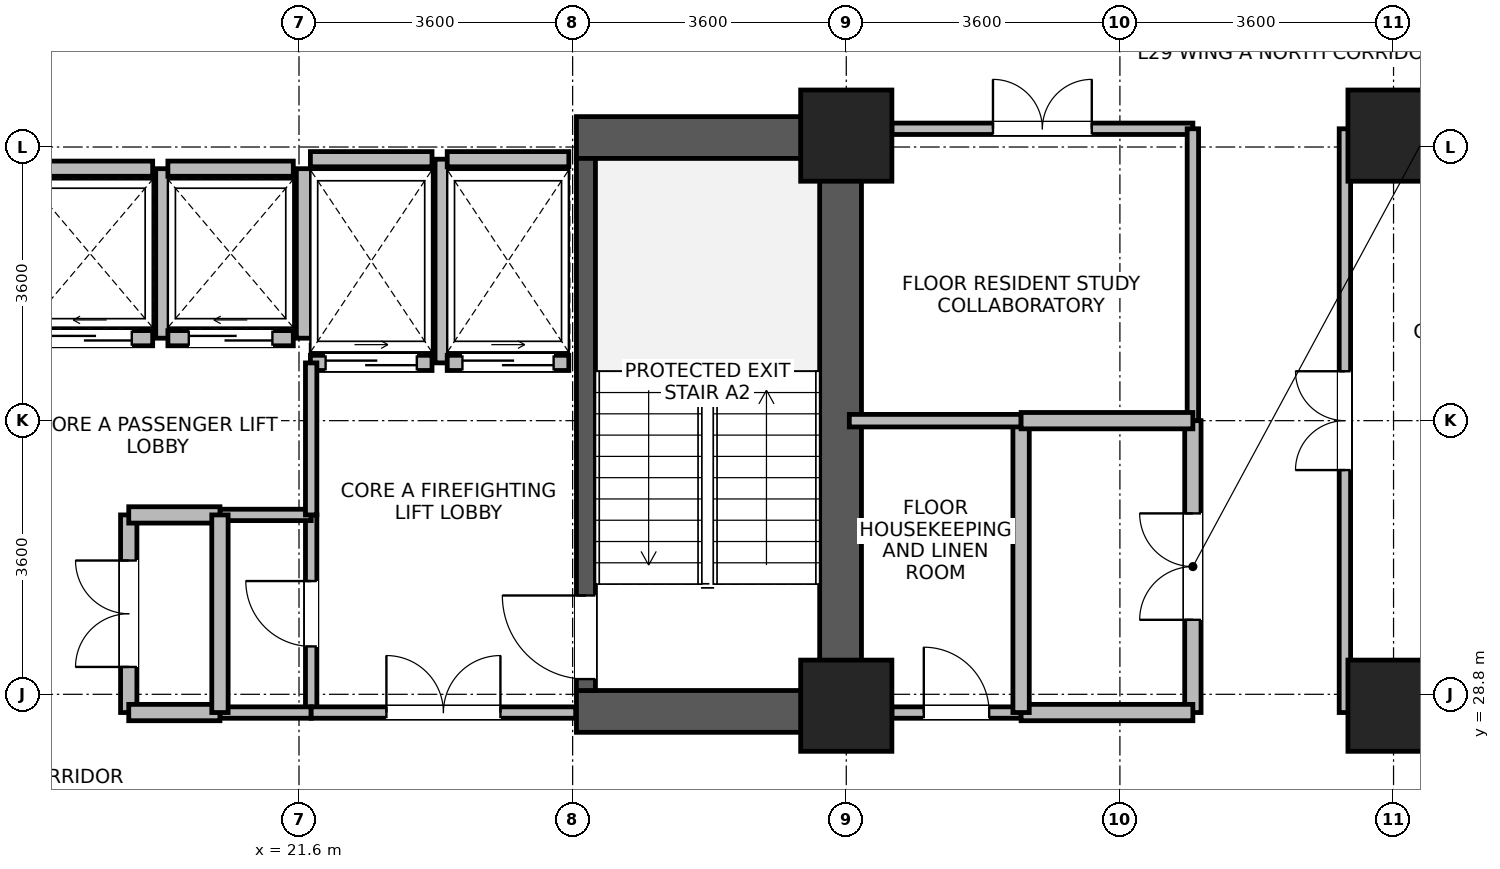
"""IFC4 building model, lengths in metres.
Left out: names, types, materials, properties, quantities, classifications, styles, units other than length and angle.
Written with IfcOpenShell. Run it as: python <this file> out.ifc"""

import sys

from ifc_helpers import new_model, si_unit, direction, frame, frame_2d, origin, origin_2d, place, context, subcontext, project, spatial, rectangle, extrude, source, transform, mapped, element, fill, save


model = new_model("IFC4")
c1 = context("Model", 3, precision=1e-05, world=origin(), true_north=direction((0.0, 1.0)))
c2 = subcontext(c1, "Body", "Model", "MODEL_VIEW")
j1 = project(units=[si_unit("LENGTHUNIT", "METRE"), si_unit("PLANEANGLEUNIT", "RADIAN")], contexts=[c1])
p1 = place(None, origin())
s1 = spatial("IfcSite", under=j1, at=p1, CompositionType="ELEMENT")
p2 = place(p1, origin())
s2 = spatial("IfcBuilding", under=s1, at=p2, CompositionType="ELEMENT")
p3 = place(p2, frame((0.0, 0.0, 115.6)))
s3 = spatial("IfcBuildingStorey", under=s2, at=p3, CompositionType="ELEMENT", Elevation=115.6)
p4 = place(p3, frame((28.725, 28.3, 0.0), z_axis=(0.0, 0.0, 1.0), x_axis=(0.0, 1.0, 0.0)))
e1 = element("IfcWall", 1, at=p4, inside=s3, PredefinedType="SHEAR", context=c2, shape_type="SweptSolid", body=[
    extrude(rectangle(XDim=8.1, YDim=0.55, at=frame_2d((4.05, 0.0))), origin(), (0.0, 0.0, 1.0), 3.45),
])
for number, where, z_axis, x_axis in (
    (2, (25.25, 28.575, 0.0), (0.0, 0.0, 1.0), (1.0, 0.0, 0.0)),
    (3, (25.25, 36.125, 0.0), (0.0, 0.0, 1.0), (1.0, 0.0, 0.0)),
):
    element("IfcWall", number, at=place(p3, frame(where, z_axis=z_axis, x_axis=x_axis)), inside=s3, PredefinedType="SHEAR", context=c2, shape_type="SweptSolid", body=[
        extrude(rectangle(XDim=3.2, YDim=0.55, at=frame_2d((1.6, 0.0))), origin(), (0.0, 0.0, 1.0), 3.45),
    ])
p5 = place(p3, frame((25.375, 28.85, 0.0), z_axis=(0.0, 0.0, 1.0), x_axis=(0.0, 1.0, 0.0)))
e4 = element("IfcWall", 4, at=p5, inside=s3, PredefinedType="SHEAR", context=c2, shape_type="SweptSolid", body=[
    extrude(rectangle(XDim=7.0, YDim=0.25, at=frame_2d((3.5, 0.0))), origin(), (0.0, 0.0, 1.0), 3.45),
])
p6 = place(p5, frame((0.15, 0.0, 0.0)))
e5 = element("IfcOpeningElement", 5, at=p6, cuts=e4, PredefinedType="OPENING", context=c2, shape_type="SweptSolid", body=[
    extrude(rectangle(XDim=1.1, YDim=2.08, at=frame_2d((0.55, 1.04))), frame((0.0, 0.135, 0.0), z_axis=(0.0, -1.0, 0.0), x_axis=(1.0, 0.0, 0.0)), (0.0, 0.0, 1.0), 0.27),
])
m1 = source(origin(), c2, "Body", "SweptSolid", [
    extrude(rectangle(XDim=1.2, YDim=1.2, at=origin_2d()), origin(), (0.0, 0.0, 1.0), 3.7),
])
for number, where, z_axis, x_axis in (
    (6, (28.8, 28.65, 0.0), (0.0, 0.0, 1.0), (1.0, 0.0, 0.0)),
    (7, (28.8, 36.15, 0.0), (0.0, 0.0, 1.0), (1.0, 0.0, 0.0)),
    (8, (36.0, 28.65, 0.0), (0.0, 0.0, 1.0), (1.0, 0.0, 0.0)),
    (9, (36.0, 36.15, 0.0), (0.0, 0.0, 1.0), (1.0, 0.0, 0.0)),
):
    element("IfcColumn", number, at=place(p3, frame(where, z_axis=z_axis, x_axis=x_axis)), inside=s3, PredefinedType="COLUMN", context=c2, shape_type="MappedRepresentation", body=[
        mapped(m1, transform((0.0, 0.0, 0.0), x_axis=(1.0, 0.0, 0.0), y_axis=(0.0, 1.0, 0.0), z_axis=(0.0, 0.0, 1.0), scale=1.0)),
    ])
p7 = place(p3, frame((18.025, 33.485, 0.0), z_axis=(0.0, 0.0, 1.0), x_axis=(1.0, 0.0, 0.0)))
e10 = element("IfcWall", 10, at=p7, inside=s3, PredefinedType="PARTITIONING", context=c2, shape_type="SweptSolid", body=[
    extrude(rectangle(XDim=1.65, YDim=0.2, at=frame_2d((0.825, 0.0))), origin(), (0.0, 0.0, 1.0), 3.43),
])
p8 = place(p7, frame((0.275, 0.0, 0.0)))
e11 = element("IfcOpeningElement", 11, at=p8, cuts=e10, PredefinedType="OPENING", context=c2, shape_type="SweptSolid", body=[
    extrude(rectangle(XDim=1.1, YDim=2.12, at=frame_2d((0.55, 1.06))), frame((0.0, 0.11, 0.0), z_axis=(0.0, -1.0, 0.0), x_axis=(1.0, 0.0, 0.0)), (0.0, 0.0, 1.0), 0.22),
])
p9 = place(p3, frame((18.025, 35.715, 0.0), z_axis=(0.0, 0.0, 1.0), x_axis=(1.0, 0.0, 0.0)))
e12 = element("IfcWall", 12, at=p9, inside=s3, PredefinedType="PARTITIONING", context=c2, shape_type="SweptSolid", body=[
    extrude(rectangle(XDim=1.65, YDim=0.2, at=frame_2d((0.825, 0.0))), origin(), (0.0, 0.0, 1.0), 3.43),
])
p10 = place(p3, frame((19.815, 33.485, 0.0), z_axis=(0.0, 0.0, 1.0), x_axis=(0.0, 1.0, 0.0)))
e13 = element("IfcWall", 13, at=p10, inside=s3, PredefinedType="PARTITIONING", context=c2, shape_type="SweptSolid", body=[
    extrude(rectangle(XDim=2.23, YDim=0.2, at=frame_2d((1.115, 0.0))), origin(), (0.0, 0.0, 1.0), 3.43),
])
p11 = place(p3, frame((19.875, 33.485, 0.0), z_axis=(0.0, 0.0, 1.0), x_axis=(1.0, 0.0, 0.0)))
e14 = element("IfcWall", 14, at=p11, inside=s3, PredefinedType="PARTITIONING", context=c2, shape_type="SweptSolid", body=[
    extrude(rectangle(XDim=1.65, YDim=0.2, at=frame_2d((0.825, 0.0))), origin(), (0.0, 0.0, 1.0), 3.43),
])
p12 = place(p11, frame((0.275, 0.0, 0.0)))
e15 = element("IfcOpeningElement", 15, at=p12, cuts=e14, PredefinedType="OPENING", context=c2, shape_type="SweptSolid", body=[
    extrude(rectangle(XDim=1.1, YDim=2.12, at=frame_2d((0.55, 1.06))), frame((0.0, 0.11, 0.0), z_axis=(0.0, -1.0, 0.0), x_axis=(1.0, 0.0, 0.0)), (0.0, 0.0, 1.0), 0.22),
])
p13 = place(p3, frame((19.875, 35.715, 0.0), z_axis=(0.0, 0.0, 1.0), x_axis=(1.0, 0.0, 0.0)))
e16 = element("IfcWall", 16, at=p13, inside=s3, PredefinedType="PARTITIONING", context=c2, shape_type="SweptSolid", body=[
    extrude(rectangle(XDim=1.65, YDim=0.2, at=frame_2d((0.825, 0.0))), origin(), (0.0, 0.0, 1.0), 3.43),
])
p14 = place(p3, frame((21.665, 33.485, 0.0), z_axis=(0.0, 0.0, 1.0), x_axis=(0.0, 1.0, 0.0)))
e17 = element("IfcWall", 17, at=p14, inside=s3, PredefinedType="PARTITIONING", context=c2, shape_type="SweptSolid", body=[
    extrude(rectangle(XDim=2.23, YDim=0.2, at=frame_2d((1.115, 0.0))), origin(), (0.0, 0.0, 1.0), 3.43),
])
p15 = place(p3, frame((21.75, 33.16, 0.0), z_axis=(0.0, 0.0, 1.0), x_axis=(1.0, 0.0, 0.0)))
e18 = element("IfcWall", 18, at=p15, inside=s3, PredefinedType="PARTITIONING", context=c2, shape_type="SweptSolid", body=[
    extrude(rectangle(XDim=1.6, YDim=0.2, at=frame_2d((0.8, 0.0))), origin(), (0.0, 0.0, 1.0), 3.43),
])
p16 = place(p15, frame((0.2, 0.0, 0.0)))
e19 = element("IfcOpeningElement", 19, at=p16, cuts=e18, PredefinedType="OPENING", context=c2, shape_type="SweptSolid", body=[
    extrude(rectangle(XDim=1.2, YDim=2.12, at=frame_2d((0.6, 1.06))), frame((0.0, 0.11, 0.0), z_axis=(0.0, -1.0, 0.0), x_axis=(1.0, 0.0, 0.0)), (0.0, 0.0, 1.0), 0.22),
])
p17 = place(p3, frame((21.75, 35.84, 0.0), z_axis=(0.0, 0.0, 1.0), x_axis=(1.0, 0.0, 0.0)))
e20 = element("IfcWall", 20, at=p17, inside=s3, PredefinedType="PARTITIONING", context=c2, shape_type="SweptSolid", body=[
    extrude(rectangle(XDim=1.6, YDim=0.2, at=frame_2d((0.8, 0.0))), origin(), (0.0, 0.0, 1.0), 2.43),
])
p18 = place(p3, frame((23.49, 33.16, 0.0), z_axis=(0.0, 0.0, 1.0), x_axis=(0.0, 1.0, 0.0)))
e21 = element("IfcWall", 21, at=p18, inside=s3, PredefinedType="PARTITIONING", context=c2, shape_type="SweptSolid", body=[
    extrude(rectangle(XDim=2.68, YDim=0.2, at=frame_2d((1.34, 0.0))), origin(), (0.0, 0.0, 1.0), 3.43),
])
p19 = place(p3, frame((23.55, 33.16, 0.0), z_axis=(0.0, 0.0, 1.0), x_axis=(1.0, 0.0, 0.0)))
e22 = element("IfcWall", 22, at=p19, inside=s3, PredefinedType="PARTITIONING", context=c2, shape_type="SweptSolid", body=[
    extrude(rectangle(XDim=1.6, YDim=0.2, at=frame_2d((0.8, 0.0))), origin(), (0.0, 0.0, 1.0), 3.43),
])
p20 = place(p19, frame((0.2, 0.0, 0.0)))
e23 = element("IfcOpeningElement", 23, at=p20, cuts=e22, PredefinedType="OPENING", context=c2, shape_type="SweptSolid", body=[
    extrude(rectangle(XDim=1.2, YDim=2.12, at=frame_2d((0.6, 1.06))), frame((0.0, 0.11, 0.0), z_axis=(0.0, -1.0, 0.0), x_axis=(1.0, 0.0, 0.0)), (0.0, 0.0, 1.0), 0.22),
])
p21 = place(p3, frame((23.55, 35.84, 0.0), z_axis=(0.0, 0.0, 1.0), x_axis=(1.0, 0.0, 0.0)))
e24 = element("IfcWall", 24, at=p21, inside=s3, PredefinedType="PARTITIONING", context=c2, shape_type="SweptSolid", body=[
    extrude(rectangle(XDim=1.6, YDim=0.2, at=frame_2d((0.8, 0.0))), origin(), (0.0, 0.0, 1.0), 2.43),
])
p22 = place(p3, frame((35.36, 28.56, 0.0), z_axis=(0.0, 0.0, 1.0), x_axis=(0.0, 1.0, 0.0)))
e25 = element("IfcWall", 25, at=p22, inside=s3, PredefinedType="PARTITIONING", context=c2, shape_type="SweptSolid", body=[
    extrude(rectangle(XDim=7.68, YDim=0.15, at=frame_2d((3.84, 0.0))), origin(), (0.0, 0.0, 1.0), 3.43),
])
p23 = place(p22, frame((3.19, 0.0, 0.0)))
e26 = element("IfcOpeningElement", 26, at=p23, cuts=e25, PredefinedType="OPENING", context=c2, shape_type="SweptSolid", body=[
    extrude(rectangle(XDim=1.3, YDim=2.12, at=frame_2d((0.65, 1.06))), frame((0.0, 0.085, 0.0), z_axis=(0.0, -1.0, 0.0), x_axis=(1.0, 0.0, 0.0)), (0.0, 0.0, 1.0), 0.17),
])
p24 = place(p3, frame((29.4, 36.24, 0.0), z_axis=(0.0, 0.0, 1.0), x_axis=(1.0, 0.0, 0.0)))
e27 = element("IfcWall", 27, at=p24, inside=s3, PredefinedType="PARTITIONING", context=c2, shape_type="SweptSolid", body=[
    extrude(rectangle(XDim=3.96, YDim=0.15, at=frame_2d((1.98, 0.0))), origin(), (0.0, 0.0, 1.0), 2.78),
])
p25 = place(p24, frame((1.33, 0.0, 0.0)))
e28 = element("IfcOpeningElement", 28, at=p25, cuts=e27, PredefinedType="OPENING", context=c2, shape_type="SweptSolid", body=[
    extrude(rectangle(XDim=1.3, YDim=2.12, at=frame_2d((0.65, 1.06))), frame((0.0, 0.085, 0.0), z_axis=(0.0, -1.0, 0.0), x_axis=(1.0, 0.0, 0.0)), (0.0, 0.0, 1.0), 0.17),
])
p26 = place(p3, frame((33.36, 32.4, 0.0), z_axis=(0.0, 0.0, 1.0), x_axis=(0.0, 1.0, 0.0)))
e29 = element("IfcWall", 29, at=p26, inside=s3, PredefinedType="PARTITIONING", context=c2, shape_type="SweptSolid", body=[
    extrude(rectangle(XDim=3.84, YDim=0.15, at=frame_2d((1.92, 0.0))), origin(), (0.0, 0.0, 1.0), 3.43),
])
p27 = place(p3, frame((33.36, 28.56, 0.0), z_axis=(0.0, 0.0, 1.0), x_axis=(0.0, 1.0, 0.0)))
e30 = element("IfcWall", 30, at=p27, inside=s3, PredefinedType="PARTITIONING", context=c2, shape_type="SweptSolid", body=[
    extrude(rectangle(XDim=3.84, YDim=0.215, at=frame_2d((1.92, 0.0))), origin(), (0.0, 0.0, 1.0), 3.43),
])
p28 = place(p27, frame((1.22, 0.0, 0.0)))
e31 = element("IfcOpeningElement", 31, at=p28, cuts=e30, PredefinedType="OPENING", context=c2, shape_type="SweptSolid", body=[
    extrude(rectangle(XDim=1.4, YDim=2.15, at=frame_2d((0.7, 1.075))), frame((0.0, 0.118, 0.0), z_axis=(0.0, -1.0, 0.0), x_axis=(1.0, 0.0, 0.0)), (0.0, 0.0, 1.0), 0.235),
])
p29 = place(p3, frame((19.36, 28.56, 0.0), z_axis=(0.0, 0.0, 1.0), x_axis=(0.0, 1.0, 0.0)))
e32 = element("IfcWall", 32, at=p29, inside=s3, PredefinedType="PARTITIONING", context=c2, shape_type="SweptSolid", body=[
    extrude(rectangle(XDim=2.6, YDim=0.215, at=frame_2d((1.3, 0.0))), origin(), (0.0, 0.0, 1.0), 3.43),
])
p30 = place(p29, frame((0.6, 0.0, 0.0)))
e33 = element("IfcOpeningElement", 33, at=p30, cuts=e32, PredefinedType="OPENING", context=c2, shape_type="SweptSolid", body=[
    extrude(rectangle(XDim=1.4, YDim=2.15, at=frame_2d((0.7, 1.075))), frame((0.0, 0.118, 0.0), z_axis=(0.0, -1.0, 0.0), x_axis=(1.0, 0.0, 0.0)), (0.0, 0.0, 1.0), 0.235),
])
p31 = place(p3, frame((21.76, 28.56, 0.0), z_axis=(0.0, 0.0, 1.0), x_axis=(0.0, 1.0, 0.0)))
e34 = element("IfcWall", 34, at=p31, inside=s3, PredefinedType="PARTITIONING", context=c2, shape_type="SweptSolid", body=[
    extrude(rectangle(XDim=2.6, YDim=0.15, at=frame_2d((1.3, 0.0))), origin(), (0.0, 0.0, 1.0), 3.43),
])
p32 = place(p31, frame((0.87, 0.0, 0.0)))
e35 = element("IfcOpeningElement", 35, at=p32, cuts=e34, PredefinedType="OPENING", context=c2, shape_type="SweptSolid", body=[
    extrude(rectangle(XDim=0.86, YDim=2.02, at=frame_2d((0.43, 1.01))), frame((0.0, 0.085, 0.0), z_axis=(0.0, -1.0, 0.0), x_axis=(1.0, 0.0, 0.0)), (0.0, 0.0, 1.0), 0.17),
])
p33 = place(p3, frame((29.4, 28.56, 0.0), z_axis=(0.0, 0.0, 1.0), x_axis=(1.0, 0.0, 0.0)))
e36 = element("IfcWall", 36, at=p33, inside=s3, PredefinedType="PARTITIONING", context=c2, shape_type="SweptSolid", body=[
    extrude(rectangle(XDim=1.7, YDim=0.15, at=frame_2d((0.85, 0.0))), origin(), (0.0, 0.0, 1.0), 2.78),
])
p34 = place(p33, frame((0.42, 0.0, 0.0)))
e37 = element("IfcOpeningElement", 37, at=p34, cuts=e36, PredefinedType="OPENING", context=c2, shape_type="SweptSolid", body=[
    extrude(rectangle(XDim=0.86, YDim=2.02, at=frame_2d((0.43, 1.01))), frame((0.0, 0.085, 0.0), z_axis=(0.0, -1.0, 0.0), x_axis=(1.0, 0.0, 0.0)), (0.0, 0.0, 1.0), 0.17),
])
p35 = place(p3, frame((31.1, 28.56, 0.0), z_axis=(0.0, 0.0, 1.0), x_axis=(1.0, 0.0, 0.0)))
e38 = element("IfcWall", 38, at=p35, inside=s3, PredefinedType="PARTITIONING", context=c2, shape_type="SweptSolid", body=[
    extrude(rectangle(XDim=2.26, YDim=0.215, at=frame_2d((1.13, 0.0))), origin(), (0.0, 0.0, 1.0), 2.78),
])
p36 = place(p3, frame((20.56, 28.56, 0.0), z_axis=(0.0, 0.0, 1.0), x_axis=(1.0, 0.0, 0.0)))
e39 = element("IfcWall", 39, at=p36, inside=s3, PredefinedType="PARTITIONING", context=c2, shape_type="SweptSolid", body=[
    extrude(rectangle(XDim=1.2, YDim=0.15, at=frame_2d((0.6, 0.0))), origin(), (0.0, 0.0, 1.0), 2.43),
])
p37 = place(p3, frame((20.56, 31.16, 0.0), z_axis=(0.0, 0.0, 1.0), x_axis=(1.0, 0.0, 0.0)))
e40 = element("IfcWall", 40, at=p37, inside=s3, PredefinedType="PARTITIONING", context=c2, shape_type="SweptSolid", body=[
    extrude(rectangle(XDim=1.2, YDim=0.15, at=frame_2d((0.6, 0.0))), origin(), (0.0, 0.0, 1.0), 3.43),
])
p38 = place(p3, frame((19.36, 28.56, 0.0), z_axis=(0.0, 0.0, 1.0), x_axis=(1.0, 0.0, 0.0)))
e41 = element("IfcWall", 41, at=p38, inside=s3, PredefinedType="PARTITIONING", context=c2, shape_type="SweptSolid", body=[
    extrude(rectangle(XDim=1.2, YDim=0.215, at=frame_2d((0.6, 0.0))), origin(), (0.0, 0.0, 1.0), 2.43),
])
p39 = place(p3, frame((19.36, 31.16, 0.0), z_axis=(0.0, 0.0, 1.0), x_axis=(1.0, 0.0, 0.0)))
e42 = element("IfcWall", 42, at=p39, inside=s3, PredefinedType="PARTITIONING", context=c2, shape_type="SweptSolid", body=[
    extrude(rectangle(XDim=1.2, YDim=0.215, at=frame_2d((0.6, 0.0))), origin(), (0.0, 0.0, 1.0), 3.43),
])
p40 = place(p3, frame((31.1, 28.56, 0.0), z_axis=(0.0, 0.0, 1.0), x_axis=(0.0, 1.0, 0.0)))
e43 = element("IfcWall", 43, at=p40, inside=s3, PredefinedType="PARTITIONING", context=c2, shape_type="SweptSolid", body=[
    extrude(rectangle(XDim=3.84, YDim=0.215, at=frame_2d((1.92, 0.0))), origin(), (0.0, 0.0, 1.0), 3.43),
])
p41 = place(p3, frame((21.76, 28.56, 0.0), z_axis=(0.0, 0.0, 1.0), x_axis=(1.0, 0.0, 0.0)))
e44 = element("IfcWall", 44, at=p41, inside=s3, PredefinedType="PARTITIONING", context=c2, shape_type="SweptSolid", body=[
    extrude(rectangle(XDim=3.48, YDim=0.15, at=frame_2d((1.74, 0.0))), origin(), (0.0, 0.0, 1.0), 2.43),
])
p42 = place(p41, frame((0.99, 0.0, 0.0)))
e45 = element("IfcOpeningElement", 45, at=p42, cuts=e44, PredefinedType="OPENING", context=c2, shape_type="SweptSolid", body=[
    extrude(rectangle(XDim=1.5, YDim=2.1, at=frame_2d((0.75, 1.05))), frame((0.0, 0.085, 0.0), z_axis=(0.0, -1.0, 0.0), x_axis=(1.0, 0.0, 0.0)), (0.0, 0.0, 1.0), 0.17),
])
p43 = place(p3, frame((20.56, 28.56, 0.0), z_axis=(0.0, 0.0, 1.0), x_axis=(0.0, 1.0, 0.0)))
e46 = element("IfcWall", 46, at=p43, inside=s3, PredefinedType="PARTITIONING", context=c2, shape_type="SweptSolid", body=[
    extrude(rectangle(XDim=2.6, YDim=0.215, at=frame_2d((1.3, 0.0))), origin(), (0.0, 0.0, 1.0), 3.43),
])
p44 = place(p3, frame((28.84, 32.4, 0.0), z_axis=(0.0, 0.0, 1.0), x_axis=(1.0, 0.0, 0.0)))
e47 = element("IfcWall", 47, at=p44, inside=s3, PredefinedType="PARTITIONING", context=c2, shape_type="SweptSolid", body=[
    extrude(rectangle(XDim=2.26, YDim=0.165, at=frame_2d((1.13, 0.0))), origin(), (0.0, 0.0, 1.0), 3.43),
])
p45 = place(p3, frame((31.1, 32.4, 0.0), z_axis=(0.0, 0.0, 1.0), x_axis=(1.0, 0.0, 0.0)))
e48 = element("IfcWall", 48, at=p45, inside=s3, PredefinedType="PARTITIONING", context=c2, shape_type="SweptSolid", body=[
    extrude(rectangle(XDim=2.26, YDim=0.215, at=frame_2d((1.13, 0.0))), origin(), (0.0, 0.0, 1.0), 3.43),
])
p46 = place(p3, frame((21.76, 31.16, 0.0), z_axis=(0.0, 0.0, 1.0), x_axis=(0.0, 1.0, 0.0)))
e49 = element("IfcWall", 49, at=p46, inside=s3, PredefinedType="PARTITIONING", context=c2, shape_type="SweptSolid", body=[
    extrude(rectangle(XDim=2.0, YDim=0.15, at=frame_2d((1.0, 0.0))), origin(), (0.0, 0.0, 1.0), 3.43),
])
p47 = place(p6, origin())
e50 = element("IfcDoor", 50, at=p47, inside=s3, OperationType="SINGLE_SWING_RIGHT", PredefinedType="DOOR", context=c2, shape_type="SweptSolid", body=[
    extrude(rectangle(XDim=1.1, YDim=2.08, at=frame_2d((0.55, 1.04))), frame((0.0, 0.025, 0.0), z_axis=(0.0, -1.0, 0.0), x_axis=(1.0, 0.0, 0.0)), (0.0, 0.0, 1.0), 0.05),
])
fill(e5, e50)
p48 = place(p8, origin())
e51 = element("IfcDoor", 51, at=p48, inside=s3, OperationType="SLIDING_TO_LEFT", PredefinedType="DOOR", context=c2, shape_type="SweptSolid", body=[
    extrude(rectangle(XDim=1.1, YDim=2.12, at=frame_2d((0.55, 1.06))), frame((0.0, 0.025, 0.0), z_axis=(0.0, -1.0, 0.0), x_axis=(1.0, 0.0, 0.0)), (0.0, 0.0, 1.0), 0.05),
])
fill(e11, e51)
p49 = place(p12, origin())
e52 = element("IfcDoor", 52, at=p49, inside=s3, OperationType="SLIDING_TO_LEFT", PredefinedType="DOOR", context=c2, shape_type="SweptSolid", body=[
    extrude(rectangle(XDim=1.1, YDim=2.12, at=frame_2d((0.55, 1.06))), frame((0.0, 0.025, 0.0), z_axis=(0.0, -1.0, 0.0), x_axis=(1.0, 0.0, 0.0)), (0.0, 0.0, 1.0), 0.05),
])
fill(e15, e52)
p50 = place(p16, origin())
e53 = element("IfcDoor", 53, at=p50, inside=s3, OperationType="SLIDING_TO_RIGHT", PredefinedType="DOOR", context=c2, shape_type="SweptSolid", body=[
    extrude(rectangle(XDim=1.2, YDim=2.12, at=frame_2d((0.6, 1.06))), frame((0.0, 0.025, 0.0), z_axis=(0.0, -1.0, 0.0), x_axis=(1.0, 0.0, 0.0)), (0.0, 0.0, 1.0), 0.05),
])
fill(e19, e53)
p51 = place(p20, origin())
e54 = element("IfcDoor", 54, at=p51, inside=s3, OperationType="SLIDING_TO_RIGHT", PredefinedType="DOOR", context=c2, shape_type="SweptSolid", body=[
    extrude(rectangle(XDim=1.2, YDim=2.12, at=frame_2d((0.6, 1.06))), frame((0.0, 0.025, 0.0), z_axis=(0.0, -1.0, 0.0), x_axis=(1.0, 0.0, 0.0)), (0.0, 0.0, 1.0), 0.05),
])
fill(e23, e54)
p52 = place(p23, origin())
e55 = element("IfcDoor", 55, at=p52, inside=s3, OperationType="DOUBLE_DOOR_SINGLE_SWING", PredefinedType="DOOR", context=c2, shape_type="SweptSolid", body=[
    extrude(rectangle(XDim=1.3, YDim=2.12, at=frame_2d((0.65, 1.06))), frame((0.0, 0.025, 0.0), z_axis=(0.0, -1.0, 0.0), x_axis=(1.0, 0.0, 0.0)), (0.0, 0.0, 1.0), 0.05),
])
fill(e26, e55)
p53 = place(p25, origin())
e56 = element("IfcDoor", 56, at=p53, inside=s3, OperationType="DOUBLE_DOOR_SINGLE_SWING", PredefinedType="DOOR", context=c2, shape_type="SweptSolid", body=[
    extrude(rectangle(XDim=1.3, YDim=2.12, at=frame_2d((0.65, 1.06))), frame((0.0, 0.025, 0.0), z_axis=(0.0, -1.0, 0.0), x_axis=(1.0, 0.0, 0.0)), (0.0, 0.0, 1.0), 0.05),
])
fill(e28, e56)
p54 = place(p28, origin())
e57 = element("IfcDoor", 57, at=p54, inside=s3, OperationType="DOUBLE_DOOR_SINGLE_SWING", PredefinedType="DOOR", context=c2, shape_type="SweptSolid", body=[
    extrude(rectangle(XDim=1.4, YDim=2.15, at=frame_2d((0.7, 1.075))), frame((0.0, 0.025, 0.0), z_axis=(0.0, -1.0, 0.0), x_axis=(1.0, 0.0, 0.0)), (0.0, 0.0, 1.0), 0.05),
])
fill(e31, e57)
p55 = place(p30, origin())
e58 = element("IfcDoor", 58, at=p55, inside=s3, OperationType="DOUBLE_DOOR_SINGLE_SWING", PredefinedType="DOOR", context=c2, shape_type="SweptSolid", body=[
    extrude(rectangle(XDim=1.4, YDim=2.15, at=frame_2d((0.7, 1.075))), frame((0.0, 0.025, 0.0), z_axis=(0.0, -1.0, 0.0), x_axis=(1.0, 0.0, 0.0)), (0.0, 0.0, 1.0), 0.05),
])
fill(e33, e58)
p56 = place(p32, origin())
e59 = element("IfcDoor", 59, at=p56, inside=s3, OperationType="SINGLE_SWING_RIGHT", PredefinedType="DOOR", context=c2, shape_type="SweptSolid", body=[
    extrude(rectangle(XDim=0.86, YDim=2.02, at=frame_2d((0.43, 1.01))), frame((0.0, 0.025, 0.0), z_axis=(0.0, -1.0, 0.0), x_axis=(1.0, 0.0, 0.0)), (0.0, 0.0, 1.0), 0.05),
])
fill(e35, e59)
p57 = place(p34, origin())
e60 = element("IfcDoor", 60, at=p57, inside=s3, OperationType="SINGLE_SWING_LEFT", PredefinedType="DOOR", context=c2, shape_type="SweptSolid", body=[
    extrude(rectangle(XDim=0.86, YDim=2.02, at=frame_2d((0.43, 1.01))), frame((0.0, 0.025, 0.0), z_axis=(0.0, -1.0, 0.0), x_axis=(1.0, 0.0, 0.0)), (0.0, 0.0, 1.0), 0.05),
])
fill(e37, e60)
p58 = place(p42, origin())
e61 = element("IfcDoor", 61, at=p58, inside=s3, OperationType="DOUBLE_DOOR_SINGLE_SWING", PredefinedType="DOOR", context=c2, shape_type="SweptSolid", body=[
    extrude(rectangle(XDim=1.5, YDim=2.1, at=frame_2d((0.75, 1.05))), frame((0.0, 0.025, 0.0), z_axis=(0.0, -1.0, 0.0), x_axis=(1.0, 0.0, 0.0)), (0.0, 0.0, 1.0), 0.05),
])
fill(e45, e61)
save(model, sys.argv[1])
